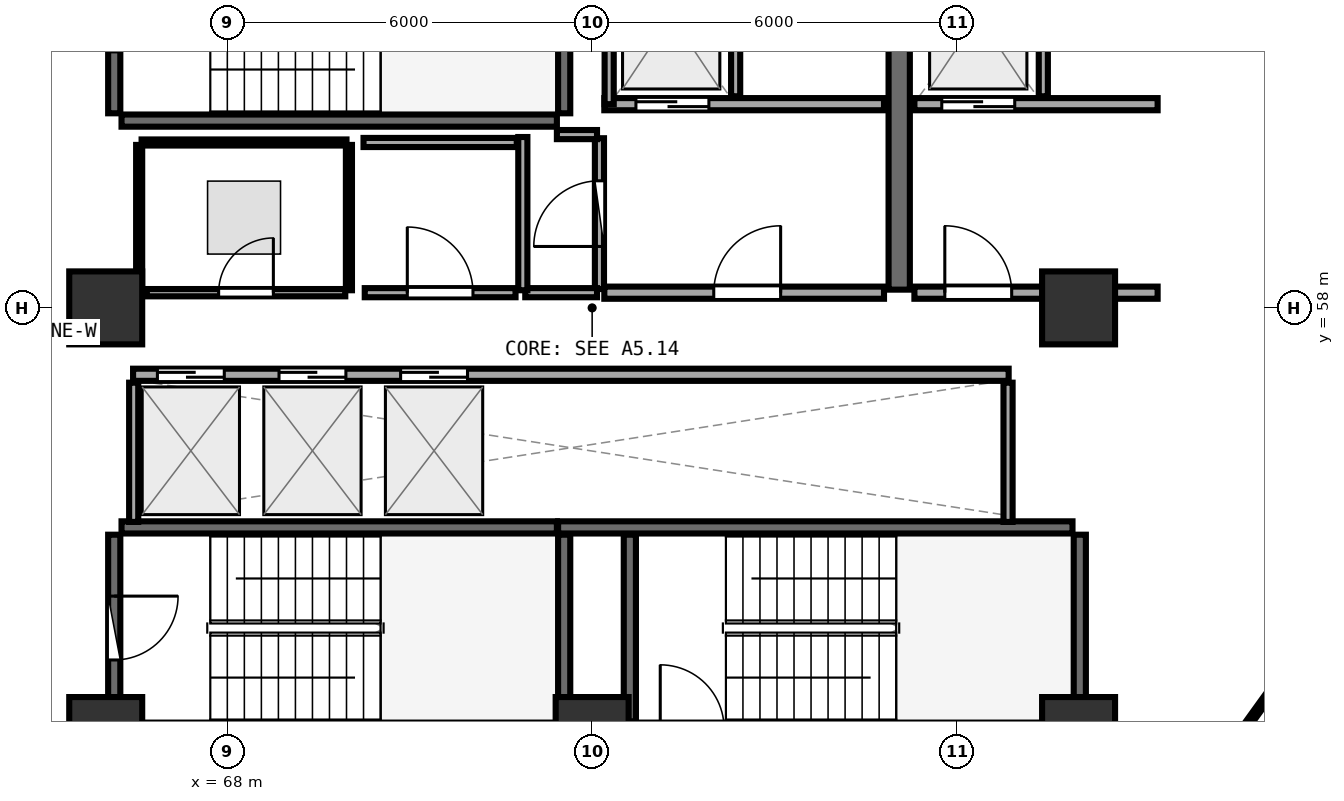
"""IFC4 building model, lengths in metres.
Left out: names, types, materials, properties, quantities, classifications, styles, units other than length and angle.
Written with IfcOpenShell. Run it as: python <this file> out.ifc"""

import sys

from ifc_helpers import new_model, si_unit, direction, frame, frame_2d, origin, origin_2d, place, context, subcontext, project, spatial, rectangle, extrude, element, fill, save


model = new_model("IFC4")
c1 = context("Model", 3, precision=1e-05, world=origin(), true_north=direction((0.0, 1.0)))
c2 = subcontext(c1, "Body", "Model", "MODEL_VIEW")
j1 = project(units=[si_unit("LENGTHUNIT", "METRE"), si_unit("PLANEANGLEUNIT", "RADIAN")], contexts=[c1])
p1 = place(None, origin())
s1 = spatial("IfcSite", under=j1, at=p1, CompositionType="ELEMENT")
p2 = place(p1, origin())
s2 = spatial("IfcBuilding", under=s1, at=p2, CompositionType="ELEMENT")
p3 = place(p2, frame((0.0, 0.0, 176.85)))
s3 = spatial("IfcBuildingStorey", under=s2, at=p3, CompositionType="ELEMENT", Elevation=176.85)
for number, where, z_axis, x_axis in (
    (1, (66.0, 51.0, 0.0), (0.0, 0.0, 1.0), (1.0, 0.0, 0.0)),
    (2, (74.0, 51.0, 0.0), (0.0, 0.0, 1.0), (1.0, 0.0, 0.0)),
    (3, (82.0, 51.0, 0.0), (0.0, 0.0, 1.0), (1.0, 0.0, 0.0)),
    (4, (82.0, 58.0, 0.0), (0.0, 0.0, 1.0), (1.0, 0.0, 0.0)),
    (5, (66.0, 58.0, 0.0), (0.0, 0.0, 1.0), (1.0, 0.0, 0.0)),
):
    element("IfcColumn", number, at=place(p3, frame(where, z_axis=z_axis, x_axis=x_axis)), inside=s3, PredefinedType="PILASTER", context=c2, shape_type="SweptSolid", body=[
        extrude(rectangle(XDim=1.2, YDim=1.2, at=origin_2d()), origin(), (0.0, 0.0, 1.0), 3.75),
    ])
p4 = place(p3, frame((66.26, 61.08, 0.0), z_axis=(0.0, 0.0, 1.0), x_axis=(1.0, 0.0, 0.0)))
e6 = element("IfcWall", 6, at=p4, inside=s3, PredefinedType="SHEAR", context=c2, shape_type="SweptSolid", body=[
    extrude(rectangle(XDim=7.16, YDim=0.2, at=frame_2d((3.58, 0.0))), origin(), (0.0, 0.0, 1.0), 3.49),
])
p5 = place(p3, frame((73.54, 61.2, 0.0), z_axis=(0.0, 0.0, 1.0), x_axis=(0.0, 1.0, 0.0)))
e7 = element("IfcWall", 7, at=p5, inside=s3, PredefinedType="SHEAR", context=c2, shape_type="SweptSolid", body=[
    extrude(rectangle(XDim=3.07, YDim=0.2, at=frame_2d((1.535, 0.0))), origin(), (0.0, 0.0, 1.0), 3.49),
])
p6 = place(p3, frame((66.14, 64.27, 0.0), z_axis=(0.0, 0.0, 1.0), x_axis=(0.0, -1.0, 0.0)))
e8 = element("IfcWall", 8, at=p6, inside=s3, PredefinedType="SHEAR", context=c2, shape_type="SweptSolid", body=[
    extrude(rectangle(XDim=3.07, YDim=0.2, at=frame_2d((1.535, 0.0))), origin(), (0.0, 0.0, 1.0), 3.49),
])
p7 = place(p6, frame((1.01, 0.0, 0.0)))
e9 = element("IfcOpeningElement", 9, at=p7, cuts=e8, PredefinedType="OPENING", context=c2, shape_type="SweptSolid", body=[
    extrude(rectangle(XDim=1.05, YDim=2.1, at=frame_2d((0.525, 1.05))), frame((0.0, 0.11, 0.0), z_axis=(0.0, -1.0, 0.0), x_axis=(1.0, 0.0, 0.0)), (0.0, 0.0, 1.0), 0.22),
])
p8 = place(p3, frame((82.02, 51.2, 0.0), z_axis=(0.0, 0.0, 1.0), x_axis=(0.0, 1.0, 0.0)))
e10 = element("IfcWall", 10, at=p8, inside=s3, PredefinedType="SHEAR", context=c2, shape_type="SweptSolid", body=[
    extrude(rectangle(XDim=3.07, YDim=0.2, at=frame_2d((1.535, 0.0))), origin(), (0.0, 0.0, 1.0), 3.49),
])
p9 = place(p3, frame((81.9, 54.39, 0.0), z_axis=(0.0, 0.0, 1.0), x_axis=(-1.0, 0.0, 0.0)))
e11 = element("IfcWall", 11, at=p9, inside=s3, PredefinedType="SHEAR", context=c2, shape_type="SweptSolid", body=[
    extrude(rectangle(XDim=8.46, YDim=0.2, at=frame_2d((4.23, 0.0))), origin(), (0.0, 0.0, 1.0), 3.49),
])
for number, where, z_axis, x_axis in (
    (12, (74.62, 54.27, 0.0), (0.0, 0.0, 1.0), (0.0, -1.0, 0.0)),
    (13, (73.54, 51.2, 0.0), (0.0, 0.0, 1.0), (0.0, 1.0, 0.0)),
):
    element("IfcWall", number, at=place(p3, frame(where, z_axis=z_axis, x_axis=x_axis)), inside=s3, PredefinedType="SHEAR", context=c2, shape_type="SweptSolid", body=[
        extrude(rectangle(XDim=3.07, YDim=0.2, at=frame_2d((1.535, 0.0))), origin(), (0.0, 0.0, 1.0), 3.49),
    ])
p10 = place(p3, frame((73.42, 54.39, 0.0), z_axis=(0.0, 0.0, 1.0), x_axis=(-1.0, 0.0, 0.0)))
e14 = element("IfcWall", 14, at=p10, inside=s3, PredefinedType="SHEAR", context=c2, shape_type="SweptSolid", body=[
    extrude(rectangle(XDim=7.16, YDim=0.2, at=frame_2d((3.58, 0.0))), origin(), (0.0, 0.0, 1.0), 3.49),
])
p11 = place(p3, frame((66.14, 54.27, 0.0), z_axis=(0.0, 0.0, 1.0), x_axis=(0.0, -1.0, 0.0)))
e15 = element("IfcWall", 15, at=p11, inside=s3, PredefinedType="SHEAR", context=c2, shape_type="SweptSolid", body=[
    extrude(rectangle(XDim=3.07, YDim=0.2, at=frame_2d((1.535, 0.0))), origin(), (0.0, 0.0, 1.0), 3.49),
])
p12 = place(p11, frame((1.01, 0.0, 0.0)))
e16 = element("IfcOpeningElement", 16, at=p12, cuts=e15, PredefinedType="OPENING", context=c2, shape_type="SweptSolid", body=[
    extrude(rectangle(XDim=1.05, YDim=2.1, at=frame_2d((0.525, 1.05))), frame((0.0, 0.11, 0.0), z_axis=(0.0, -1.0, 0.0), x_axis=(1.0, 0.0, 0.0)), (0.0, 0.0, 1.0), 0.22),
])
p13 = place(p3, frame((79.05, 58.3, 0.0), z_axis=(0.0, 0.0, 1.0), x_axis=(0.0, 1.0, 0.0)))
e17 = element("IfcWall", 17, at=p13, inside=s3, PredefinedType="SHEAR", context=c2, shape_type="SweptSolid", body=[
    extrude(rectangle(XDim=6.3, YDim=0.35, at=frame_2d((3.15, 0.0))), origin(), (0.0, 0.0, 1.0), 3.49),
])
p14 = place(p3, frame((74.2, 61.35, 0.0), z_axis=(0.0, 0.0, 1.0), x_axis=(1.0, 0.0, 0.0)))
e18 = element("IfcWall", 18, at=p14, inside=s3, PredefinedType="SOLIDWALL", context=c2, shape_type="SweptSolid", body=[
    extrude(rectangle(XDim=4.6, YDim=0.2, at=frame_2d((2.3, 0.0))), origin(), (0.0, 0.0, 1.0), 3.48),
])
p15 = place(p14, frame((0.52, 0.0, 0.0)))
e19 = element("IfcOpeningElement", 19, at=p15, cuts=e18, PredefinedType="OPENING", context=c2, shape_type="SweptSolid", body=[
    extrude(rectangle(XDim=1.2, YDim=2.15, at=frame_2d((0.6, 1.075))), frame((0.0, 0.11, 0.0), z_axis=(0.0, -1.0, 0.0), x_axis=(1.0, 0.0, 0.0)), (0.0, 0.0, 1.0), 0.22),
])
p16 = place(p3, frame((74.28, 61.35, 0.0), z_axis=(0.0, 0.0, 1.0), x_axis=(0.0, 1.0, 0.0)))
e20 = element("IfcWall", 20, at=p16, inside=s3, PredefinedType="PARTITIONING", context=c2, shape_type="SweptSolid", body=[
    extrude(rectangle(XDim=2.97, YDim=0.15, at=frame_2d((1.485, 0.0))), origin(), (0.0, 0.0, 1.0), 3.48),
])
p17 = place(p3, frame((76.36, 61.48, 0.0), z_axis=(0.0, 0.0, 1.0), x_axis=(0.0, 1.0, 0.0)))
e21 = element("IfcWall", 21, at=p17, inside=s3, PredefinedType="PARTITIONING", context=c2, shape_type="SweptSolid", body=[
    extrude(rectangle(XDim=2.84, YDim=0.15, at=frame_2d((1.42, 0.0))), origin(), (0.0, 0.0, 1.0), 3.48),
])
p18 = place(p3, frame((79.3, 61.35, 0.0), z_axis=(0.0, 0.0, 1.0), x_axis=(1.0, 0.0, 0.0)))
e22 = element("IfcWall", 22, at=p18, inside=s3, PredefinedType="SOLIDWALL", context=c2, shape_type="SweptSolid", body=[
    extrude(rectangle(XDim=4.0, YDim=0.2, at=frame_2d((2.0, 0.0))), origin(), (0.0, 0.0, 1.0), 2.775),
])
p19 = place(p18, frame((0.45, 0.0, 0.0)))
e23 = element("IfcOpeningElement", 23, at=p19, cuts=e22, PredefinedType="OPENING", context=c2, shape_type="SweptSolid", body=[
    extrude(rectangle(XDim=1.2, YDim=2.15, at=frame_2d((0.6, 1.075))), frame((0.0, 0.11, 0.0), z_axis=(0.0, -1.0, 0.0), x_axis=(1.0, 0.0, 0.0)), (0.0, 0.0, 1.0), 0.22),
])
p20 = place(p3, frame((81.42, 61.48, 0.0), z_axis=(0.0, 0.0, 1.0), x_axis=(0.0, 1.0, 0.0)))
e24 = element("IfcWall", 24, at=p20, inside=s3, PredefinedType="PARTITIONING", context=c2, shape_type="SweptSolid", body=[
    extrude(rectangle(XDim=2.84, YDim=0.15, at=frame_2d((1.42, 0.0))), origin(), (0.0, 0.0, 1.0), 3.48),
])
p21 = place(p3, frame((74.2, 58.25, 0.0), z_axis=(0.0, 0.0, 1.0), x_axis=(1.0, 0.0, 0.0)))
e25 = element("IfcWall", 25, at=p21, inside=s3, PredefinedType="SOLIDWALL", context=c2, shape_type="SweptSolid", body=[
    extrude(rectangle(XDim=4.6, YDim=0.2, at=frame_2d((2.3, 0.0))), origin(), (0.0, 0.0, 1.0), 3.48),
])
p22 = place(p21, frame((1.8, 0.0, 0.0)))
e26 = element("IfcOpeningElement", 26, at=p22, cuts=e25, PredefinedType="OPENING", context=c2, shape_type="SweptSolid", body=[
    extrude(rectangle(XDim=1.1, YDim=2.1, at=frame_2d((0.55, 1.05))), frame((0.0, 0.11, 0.0), z_axis=(0.0, -1.0, 0.0), x_axis=(1.0, 0.0, 0.0)), (0.0, 0.0, 1.0), 0.22),
])
p23 = place(p3, frame((79.3, 58.25, 0.0), z_axis=(0.0, 0.0, 1.0), x_axis=(1.0, 0.0, 0.0)))
e27 = element("IfcWall", 27, at=p23, inside=s3, PredefinedType="SOLIDWALL", context=c2, shape_type="SweptSolid", body=[
    extrude(rectangle(XDim=4.0, YDim=0.2, at=frame_2d((2.0, 0.0))), origin(), (0.0, 0.0, 1.0), 2.775),
])
p24 = place(p23, frame((0.5, 0.0, 0.0)))
e28 = element("IfcOpeningElement", 28, at=p24, cuts=e27, PredefinedType="OPENING", context=c2, shape_type="SweptSolid", body=[
    extrude(rectangle(XDim=1.1, YDim=2.1, at=frame_2d((0.55, 1.05))), frame((0.0, 0.11, 0.0), z_axis=(0.0, -1.0, 0.0), x_axis=(1.0, 0.0, 0.0)), (0.0, 0.0, 1.0), 0.22),
])
p25 = place(p3, frame((66.45, 56.9, 0.0), z_axis=(0.0, 0.0, 1.0), x_axis=(1.0, 0.0, 0.0)))
e29 = element("IfcWall", 29, at=p25, inside=s3, PredefinedType="SOLIDWALL", context=c2, shape_type="SweptSolid", body=[
    extrude(rectangle(XDim=14.4, YDim=0.2, at=frame_2d((7.2, 0.0))), origin(), (0.0, 0.0, 1.0), 3.48),
])
p26 = place(p25, frame((0.4, 0.0, 0.0)))
e30 = element("IfcOpeningElement", 30, at=p26, cuts=e29, PredefinedType="OPENING", context=c2, shape_type="SweptSolid", body=[
    extrude(rectangle(XDim=1.1, YDim=2.1, at=frame_2d((0.55, 1.05))), frame((0.0, 0.11, 0.0), z_axis=(0.0, -1.0, 0.0), x_axis=(1.0, 0.0, 0.0)), (0.0, 0.0, 1.0), 0.22),
])
p27 = place(p25, frame((2.4, 0.0, 0.0)))
e31 = element("IfcOpeningElement", 31, at=p27, cuts=e29, PredefinedType="OPENING", context=c2, shape_type="SweptSolid", body=[
    extrude(rectangle(XDim=1.1, YDim=2.1, at=frame_2d((0.55, 1.05))), frame((0.0, 0.11, 0.0), z_axis=(0.0, -1.0, 0.0), x_axis=(1.0, 0.0, 0.0)), (0.0, 0.0, 1.0), 0.22),
])
p28 = place(p25, frame((4.4, 0.0, 0.0)))
e32 = element("IfcOpeningElement", 32, at=p28, cuts=e29, PredefinedType="OPENING", context=c2, shape_type="SweptSolid", body=[
    extrude(rectangle(XDim=1.1, YDim=2.1, at=frame_2d((0.55, 1.05))), frame((0.0, 0.11, 0.0), z_axis=(0.0, -1.0, 0.0), x_axis=(1.0, 0.0, 0.0)), (0.0, 0.0, 1.0), 0.22),
])
for number, where, z_axis, x_axis in (
    (33, (66.46, 54.48, 0.0), (0.0, 0.0, 1.0), (0.0, 1.0, 0.0)),
    (34, (80.84, 54.48, 0.0), (0.0, 0.0, 1.0), (0.0, 1.0, 0.0)),
):
    element("IfcWall", number, at=place(p3, frame(where, z_axis=z_axis, x_axis=x_axis)), inside=s3, PredefinedType="PARTITIONING", context=c2, shape_type="SweptSolid", body=[
        extrude(rectangle(XDim=2.29, YDim=0.15, at=frame_2d((1.145, 0.0))), origin(), (0.0, 0.0, 1.0), 3.48),
    ])
p29 = place(p3, frame((74.12, 58.31, 0.0), z_axis=(0.0, 0.0, 1.0), x_axis=(0.0, 1.0, 0.0)))
e35 = element("IfcWall", 35, at=p29, inside=s3, PredefinedType="PARTITIONING", context=c2, shape_type="SweptSolid", body=[
    extrude(rectangle(XDim=2.48, YDim=0.15, at=frame_2d((1.24, 0.0))), origin(), (0.0, 0.0, 1.0), 3.48),
])
p30 = place(p29, frame((0.7, 0.0, 0.0)))
e36 = element("IfcOpeningElement", 36, at=p30, cuts=e35, PredefinedType="OPENING", context=c2, shape_type="SweptSolid", body=[
    extrude(rectangle(XDim=1.08, YDim=2.1, at=frame_2d((0.54, 1.05))), frame((0.0, 0.085, 0.0), z_axis=(0.0, -1.0, 0.0), x_axis=(1.0, 0.0, 0.0)), (0.0, 0.0, 1.0), 0.17),
])
p31 = place(p3, frame((66.675, 58.25, 0.0), z_axis=(0.0, 0.0, 1.0), x_axis=(1.0, 0.0, 0.0)))
e37 = element("IfcWall", 37, at=p31, inside=s3, PredefinedType="PARTITIONING", context=c2, shape_type="SweptSolid", body=[
    extrude(rectangle(XDim=3.265, YDim=0.12, at=frame_2d((1.632, 0.0))), origin(), (0.0, 0.0, 1.0), 3.48),
])
p32 = place(p31, frame((1.182, 0.0, 0.0)))
e38 = element("IfcOpeningElement", 38, at=p32, cuts=e37, PredefinedType="OPENING", context=c2, shape_type="SweptSolid", body=[
    extrude(rectangle(XDim=0.9, YDim=2.08, at=frame_2d((0.45, 1.04))), frame((0.0, 0.07, 0.0), z_axis=(0.0, -1.0, 0.0), x_axis=(1.0, 0.0, 0.0)), (0.0, 0.0, 1.0), 0.14),
])
p33 = place(p3, frame((70.26, 58.25, 0.0), z_axis=(0.0, 0.0, 1.0), x_axis=(1.0, 0.0, 0.0)))
e39 = element("IfcWall", 39, at=p33, inside=s3, PredefinedType="PARTITIONING", context=c2, shape_type="SweptSolid", body=[
    extrude(rectangle(XDim=2.48, YDim=0.15, at=frame_2d((1.24, 0.0))), origin(), (0.0, 0.0, 1.0), 3.48),
])
p34 = place(p33, frame((0.7, 0.0, 0.0)))
e40 = element("IfcOpeningElement", 40, at=p34, cuts=e39, PredefinedType="OPENING", context=c2, shape_type="SweptSolid", body=[
    extrude(rectangle(XDim=1.08, YDim=2.1, at=frame_2d((0.54, 1.05))), frame((0.0, 0.085, 0.0), z_axis=(0.0, -1.0, 0.0), x_axis=(1.0, 0.0, 0.0)), (0.0, 0.0, 1.0), 0.17),
])
p35 = place(p3, frame((72.9, 58.25, 0.0), z_axis=(0.0, 0.0, 1.0), x_axis=(1.0, 0.0, 0.0)))
e41 = element("IfcWall", 41, at=p35, inside=s3, PredefinedType="PARTITIONING", context=c2, shape_type="SweptSolid", body=[
    extrude(rectangle(XDim=1.18, YDim=0.15, at=frame_2d((0.59, 0.0))), origin(), (0.0, 0.0, 1.0), 3.48),
])
p36 = place(p3, frame((74.08, 60.85, 0.0), z_axis=(0.0, 0.0, 1.0), x_axis=(-1.0, 0.0, 0.0)))
e42 = element("IfcWall", 42, at=p36, inside=s3, PredefinedType="PARTITIONING", context=c2, shape_type="SweptSolid", body=[
    extrude(rectangle(XDim=0.66, YDim=0.15, at=frame_2d((0.33, 0.0))), origin(), (0.0, 0.0, 1.0), 3.48),
])
p37 = place(p3, frame((72.86, 60.81, 0.0), z_axis=(0.0, 0.0, 1.0), x_axis=(0.0, -1.0, 0.0)))
e43 = element("IfcWall", 43, at=p37, inside=s3, PredefinedType="PARTITIONING", context=c2, shape_type="SweptSolid", body=[
    extrude(rectangle(XDim=2.52, YDim=0.15, at=frame_2d((1.26, 0.0))), origin(), (0.0, 0.0, 1.0), 3.48),
])
p38 = place(p3, frame((70.0, 58.29, 0.0), z_axis=(0.0, 0.0, 1.0), x_axis=(0.0, 1.0, 0.0)))
e44 = element("IfcWall", 44, at=p38, inside=s3, PredefinedType="PARTITIONING", context=c2, shape_type="SweptSolid", body=[
    extrude(rectangle(XDim=2.39, YDim=0.1, at=frame_2d((1.195, 0.0))), origin(), (0.0, 0.0, 1.0), 3.48),
])
p39 = place(p3, frame((69.96, 60.72, 0.0), z_axis=(0.0, 0.0, 1.0), x_axis=(-1.0, 0.0, 0.0)))
e45 = element("IfcWall", 45, at=p39, inside=s3, PredefinedType="PARTITIONING", context=c2, shape_type="SweptSolid", body=[
    extrude(rectangle(XDim=3.37, YDim=0.1, at=frame_2d((1.685, 0.0))), origin(), (0.0, 0.0, 1.0), 3.48),
])
p40 = place(p3, frame((66.55, 60.68, 0.0), z_axis=(0.0, 0.0, 1.0), x_axis=(0.0, -1.0, 0.0)))
e46 = element("IfcWall", 46, at=p40, inside=s3, PredefinedType="PARTITIONING", context=c2, shape_type="SweptSolid", body=[
    extrude(rectangle(XDim=2.383, YDim=0.1, at=frame_2d((1.191, 0.0))), origin(), (0.0, 0.0, 1.0), 3.48),
])
p41 = place(p3, frame((72.76, 60.72, 0.0), z_axis=(0.0, 0.0, 1.0), x_axis=(-1.0, 0.0, 0.0)))
e47 = element("IfcWall", 47, at=p41, inside=s3, PredefinedType="PARTITIONING", context=c2, shape_type="SweptSolid", body=[
    extrude(rectangle(XDim=2.52, YDim=0.15, at=frame_2d((1.26, 0.0))), origin(), (0.0, 0.0, 1.0), 3.48),
])
p42 = place(p3, frame((82.829, 48.448, 0.0), z_axis=(0.0, 0.0, 1.0), x_axis=(0.584802550896, 0.811175675465, 0.0)))
e48 = element("IfcWall", 48, at=p42, inside=s3, PredefinedType="PARTITIONING", context=c2, shape_type="SweptSolid", body=[
    extrude(rectangle(XDim=7.659, YDim=0.1, at=frame_2d((3.83, 0.0))), origin(), (0.0, 0.0, 1.0), 2.975),
])
p43 = place(p12, origin())
e49 = element("IfcDoor", 49, at=p43, inside=s3, OperationType="SINGLE_SWING_LEFT", PredefinedType="DOOR", context=c2, shape_type="SweptSolid", body=[
    extrude(rectangle(XDim=1.05, YDim=2.1, at=frame_2d((0.525, 1.05))), frame((0.0, 0.025, 0.0), z_axis=(0.0, -1.0, 0.0), x_axis=(1.0, 0.0, 0.0)), (0.0, 0.0, 1.0), 0.05),
])
fill(e16, e49)
p44 = place(p15, origin())
e50 = element("IfcDoor", 50, at=p44, inside=s3, OperationType="DOUBLE_DOOR_SLIDING", PredefinedType="DOOR", context=c2, shape_type="SweptSolid", body=[
    extrude(rectangle(XDim=1.2, YDim=2.15, at=frame_2d((0.6, 1.075))), frame((0.0, 0.025, 0.0), z_axis=(0.0, -1.0, 0.0), x_axis=(1.0, 0.0, 0.0)), (0.0, 0.0, 1.0), 0.05),
])
fill(e19, e50)
p45 = place(p19, origin())
e51 = element("IfcDoor", 51, at=p45, inside=s3, OperationType="DOUBLE_DOOR_SLIDING", PredefinedType="DOOR", context=c2, shape_type="SweptSolid", body=[
    extrude(rectangle(XDim=1.2, YDim=2.15, at=frame_2d((0.6, 1.075))), frame((0.0, 0.025, 0.0), z_axis=(0.0, -1.0, 0.0), x_axis=(1.0, 0.0, 0.0)), (0.0, 0.0, 1.0), 0.05),
])
fill(e23, e51)
p46 = place(p22, frame((1.1, 0.0, 0.0), z_axis=(0.0, 0.0, 1.0), x_axis=(-1.0, 0.0, 0.0)))
e52 = element("IfcDoor", 52, at=p46, inside=s3, OperationType="SINGLE_SWING_LEFT", PredefinedType="DOOR", context=c2, shape_type="SweptSolid", body=[
    extrude(rectangle(XDim=1.1, YDim=2.1, at=frame_2d((0.55, 1.05))), frame((0.0, 0.025, 0.0), z_axis=(0.0, -1.0, 0.0), x_axis=(1.0, 0.0, 0.0)), (0.0, 0.0, 1.0), 0.05),
])
fill(e26, e52)
p47 = place(p24, frame((1.1, 0.0, 0.0), z_axis=(0.0, 0.0, 1.0), x_axis=(-1.0, 0.0, 0.0)))
e53 = element("IfcDoor", 53, at=p47, inside=s3, OperationType="SINGLE_SWING_RIGHT", PredefinedType="DOOR", context=c2, shape_type="SweptSolid", body=[
    extrude(rectangle(XDim=1.1, YDim=2.1, at=frame_2d((0.55, 1.05))), frame((0.0, 0.025, 0.0), z_axis=(0.0, -1.0, 0.0), x_axis=(1.0, 0.0, 0.0)), (0.0, 0.0, 1.0), 0.05),
])
fill(e28, e53)
p48 = place(p26, origin())
e54 = element("IfcDoor", 54, at=p48, inside=s3, OperationType="DOUBLE_DOOR_SLIDING", PredefinedType="DOOR", context=c2, shape_type="SweptSolid", body=[
    extrude(rectangle(XDim=1.1, YDim=2.1, at=frame_2d((0.55, 1.05))), frame((0.0, 0.025, 0.0), z_axis=(0.0, -1.0, 0.0), x_axis=(1.0, 0.0, 0.0)), (0.0, 0.0, 1.0), 0.05),
])
fill(e30, e54)
p49 = place(p27, origin())
e55 = element("IfcDoor", 55, at=p49, inside=s3, OperationType="DOUBLE_DOOR_SLIDING", PredefinedType="DOOR", context=c2, shape_type="SweptSolid", body=[
    extrude(rectangle(XDim=1.1, YDim=2.1, at=frame_2d((0.55, 1.05))), frame((0.0, 0.025, 0.0), z_axis=(0.0, -1.0, 0.0), x_axis=(1.0, 0.0, 0.0)), (0.0, 0.0, 1.0), 0.05),
])
fill(e31, e55)
p50 = place(p28, origin())
e56 = element("IfcDoor", 56, at=p50, inside=s3, OperationType="DOUBLE_DOOR_SLIDING", PredefinedType="DOOR", context=c2, shape_type="SweptSolid", body=[
    extrude(rectangle(XDim=1.1, YDim=2.1, at=frame_2d((0.55, 1.05))), frame((0.0, 0.025, 0.0), z_axis=(0.0, -1.0, 0.0), x_axis=(1.0, 0.0, 0.0)), (0.0, 0.0, 1.0), 0.05),
])
fill(e32, e56)
p51 = place(p30, origin())
e57 = element("IfcDoor", 57, at=p51, inside=s3, OperationType="SINGLE_SWING_LEFT", PredefinedType="DOOR", context=c2, shape_type="SweptSolid", body=[
    extrude(rectangle(XDim=1.08, YDim=2.1, at=frame_2d((0.54, 1.05))), frame((0.0, 0.025, 0.0), z_axis=(0.0, -1.0, 0.0), x_axis=(1.0, 0.0, 0.0)), (0.0, 0.0, 1.0), 0.05),
])
fill(e36, e57)
p52 = place(p32, origin())
e58 = element("IfcDoor", 58, at=p52, inside=s3, OperationType="SINGLE_SWING_RIGHT", PredefinedType="DOOR", context=c2, shape_type="SweptSolid", body=[
    extrude(rectangle(XDim=0.9, YDim=2.08, at=frame_2d((0.45, 1.04))), frame((0.0, 0.025, 0.0), z_axis=(0.0, -1.0, 0.0), x_axis=(1.0, 0.0, 0.0)), (0.0, 0.0, 1.0), 0.05),
])
fill(e38, e58)
p53 = place(p34, origin())
e59 = element("IfcDoor", 59, at=p53, inside=s3, OperationType="SINGLE_SWING_LEFT", PredefinedType="DOOR", context=c2, shape_type="SweptSolid", body=[
    extrude(rectangle(XDim=1.08, YDim=2.1, at=frame_2d((0.54, 1.05))), frame((0.0, 0.025, 0.0), z_axis=(0.0, -1.0, 0.0), x_axis=(1.0, 0.0, 0.0)), (0.0, 0.0, 1.0), 0.05),
])
fill(e40, e59)
save(model, sys.argv[1])
